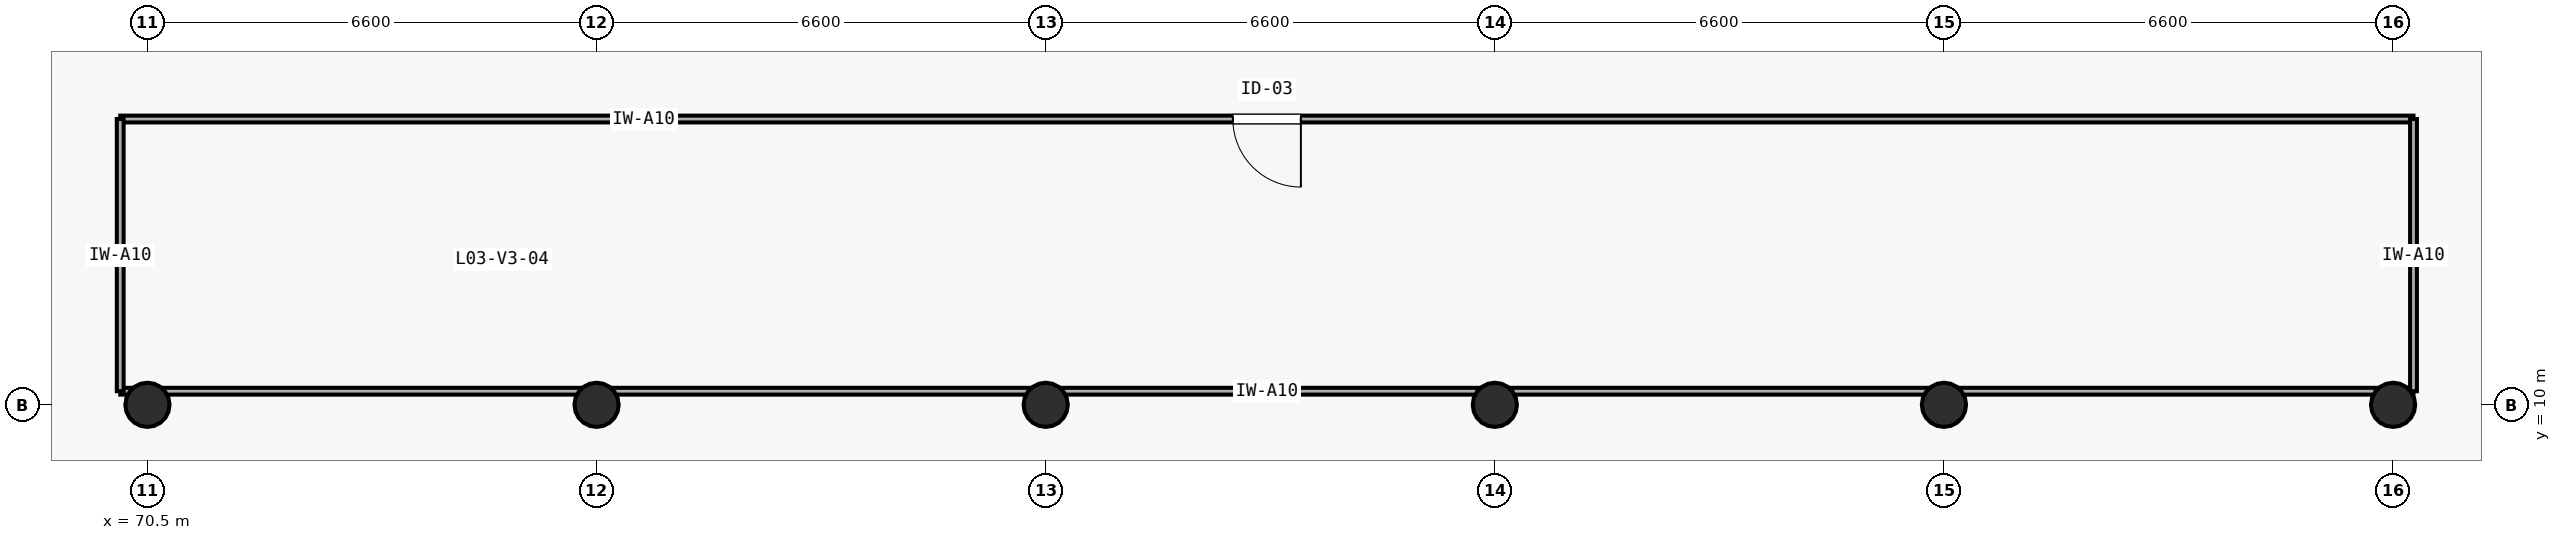
"""IFC4 building model, lengths in metres.
Left out: names, types, materials, properties, quantities, classifications, styles, units other than length and angle.
Written with IfcOpenShell. Run it as: python <this file> out.ifc"""

import sys

from ifc_helpers import new_model, si_unit, direction, frame, frame_2d, origin, origin_2d, place, context, subcontext, project, spatial, rectangle, circle, extrude, element, fill, save


model = new_model("IFC4")
c1 = context("Model", 3, precision=1e-05, world=origin(), true_north=direction((0.0, 1.0)))
c2 = subcontext(c1, "Body", "Model", "MODEL_VIEW")
j1 = project(units=[si_unit("LENGTHUNIT", "METRE"), si_unit("PLANEANGLEUNIT", "RADIAN")], contexts=[c1])
p1 = place(None, origin())
s1 = spatial("IfcSite", under=j1, at=p1, CompositionType="ELEMENT")
p2 = place(p1, origin())
s2 = spatial("IfcBuilding", under=s1, at=p2, CompositionType="ELEMENT")
p3 = place(p2, frame((0.0, 0.0, 12.6)))
s3 = spatial("IfcBuildingStorey", under=s2, at=p3, CompositionType="ELEMENT", Elevation=12.6)
for number, where, z_axis, x_axis in (
    (1, (70.5, 10.0, 0.0), (0.0, 0.0, 1.0), (1.0, 0.0, 0.0)),
    (2, (77.1, 10.0, 0.0), (0.0, 0.0, 1.0), (1.0, 0.0, 0.0)),
    (3, (83.7, 10.0, 0.0), (0.0, 0.0, 1.0), (1.0, 0.0, 0.0)),
    (4, (90.3, 10.0, 0.0), (0.0, 0.0, 1.0), (1.0, 0.0, 0.0)),
    (5, (96.9, 10.0, 0.0), (0.0, 0.0, 1.0), (1.0, 0.0, 0.0)),
    (6, (103.5, 10.0, 0.0), (0.0, 0.0, 1.0), (1.0, 0.0, 0.0)),
):
    element("IfcColumn", number, at=place(p3, frame(where, z_axis=z_axis, x_axis=x_axis)), inside=s3, PredefinedType="COLUMN", context=c2, shape_type="SweptSolid", body=[
        extrude(circle(Radius=0.325, at=origin_2d()), origin(), (0.0, 0.0, 1.0), 4.2),
    ])
p4 = place(p3, frame((70.1, 10.2, 0.0), z_axis=(0.0, 0.0, 1.0), x_axis=(1.0, 0.0, 0.0)))
e7 = element("IfcWall", 7, at=p4, inside=s3, PredefinedType="PARTITIONING", context=c2, shape_type="SweptSolid", body=[
    extrude(rectangle(XDim=33.7, YDim=0.1, at=frame_2d((16.85, 0.0))), origin(), (0.0, 0.0, 1.0), 3.285),
])
p5 = place(p3, frame((70.1, 14.2, 0.0), z_axis=(0.0, 0.0, 1.0), x_axis=(1.0, 0.0, 0.0)))
e8 = element("IfcWall", 8, at=p5, inside=s3, PredefinedType="PARTITIONING", context=c2, shape_type="SweptSolid", body=[
    extrude(rectangle(XDim=33.7, YDim=0.1, at=frame_2d((16.85, 0.0))), origin(), (0.0, 0.0, 1.0), 3.9),
])
p6 = place(p5, frame((16.35, 0.0, 0.0)))
e9 = element("IfcOpeningElement", 9, at=p6, cuts=e8, PredefinedType="OPENING", context=c2, shape_type="SweptSolid", body=[
    extrude(rectangle(XDim=1.0, YDim=2.1, at=frame_2d((0.5, 1.05))), frame((0.0, 0.06, 0.0), z_axis=(0.0, -1.0, 0.0), x_axis=(1.0, 0.0, 0.0)), (0.0, 0.0, 1.0), 0.12),
])
p7 = place(p3, frame((70.1, 10.2, 0.0), z_axis=(0.0, 0.0, 1.0), x_axis=(0.0, 1.0, 0.0)))
e10 = element("IfcWall", 10, at=p7, inside=s3, PredefinedType="PARTITIONING", context=c2, shape_type="SweptSolid", body=[
    extrude(rectangle(XDim=4.0, YDim=0.1, at=frame_2d((2.0, 0.0))), origin(), (0.0, 0.0, 1.0), 3.9),
])
p8 = place(p3, frame((103.8, 10.2, 0.0), z_axis=(0.0, 0.0, 1.0), x_axis=(0.0, 1.0, 0.0)))
e11 = element("IfcWall", 11, at=p8, inside=s3, PredefinedType="PARTITIONING", context=c2, shape_type="SweptSolid", body=[
    extrude(rectangle(XDim=4.0, YDim=0.1, at=frame_2d((2.0, 0.0))), origin(), (0.0, 0.0, 1.0), 3.585),
])
p9 = place(p6, frame((1.0, 0.0, 0.0), z_axis=(0.0, 0.0, 1.0), x_axis=(-1.0, 0.0, 0.0)))
e12 = element("IfcDoor", 12, at=p9, inside=s3, OperationType="SINGLE_SWING_LEFT", PredefinedType="DOOR", context=c2, shape_type="SweptSolid", body=[
    extrude(rectangle(XDim=1.0, YDim=2.1, at=frame_2d((0.5, 1.05))), frame((0.0, 0.025, 0.0), z_axis=(0.0, -1.0, 0.0), x_axis=(1.0, 0.0, 0.0)), (0.0, 0.0, 1.0), 0.05),
])
fill(e9, e12)
save(model, sys.argv[1])
